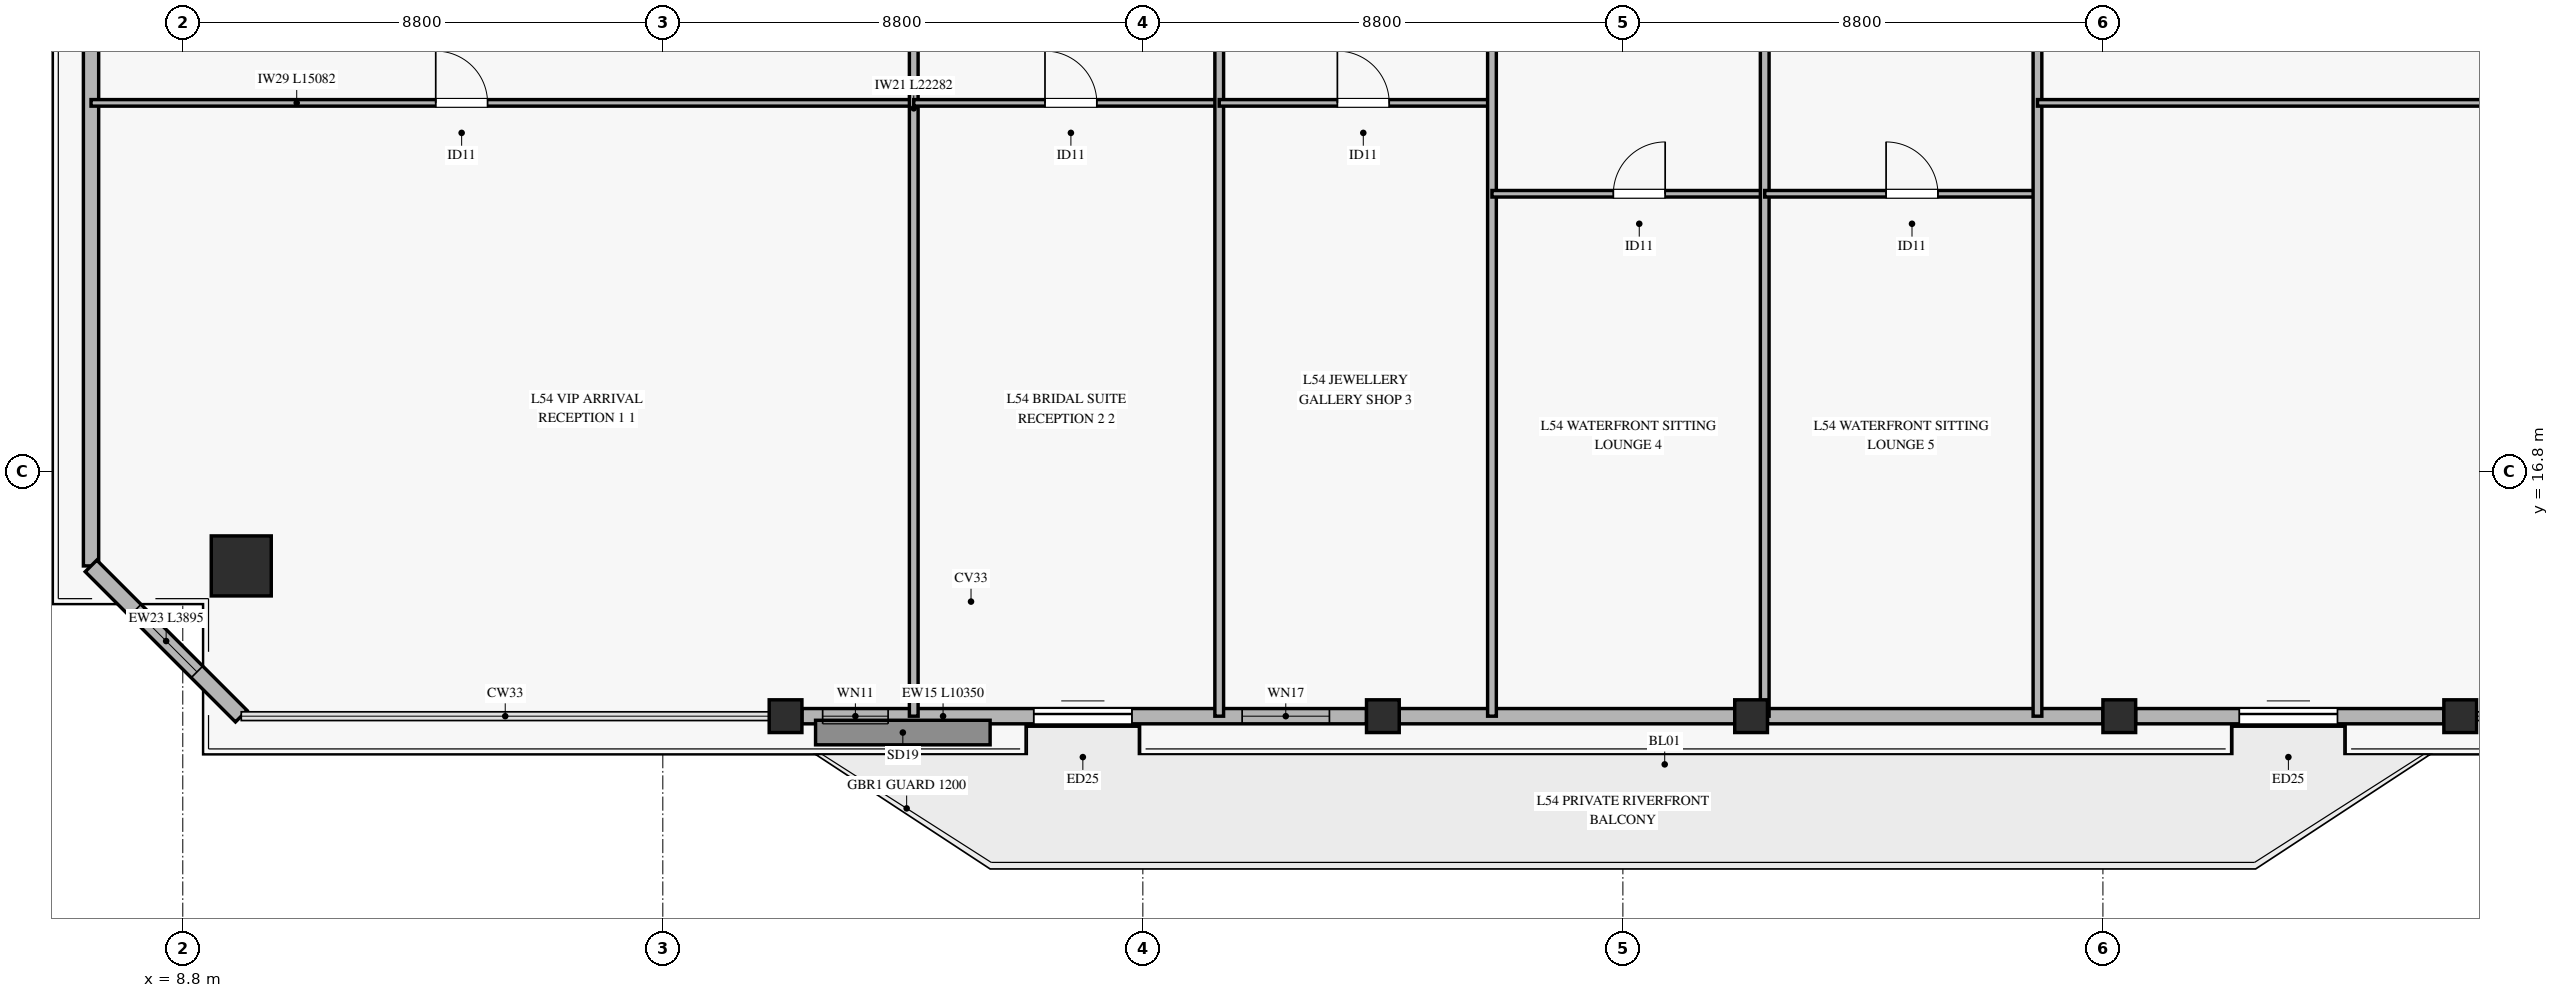
"""IFC4 building model, lengths in metres.
Left out: names, types, materials, properties, quantities, classifications, styles, units other than length and angle.
Written with IfcOpenShell. Run it as: python <this file> out.ifc"""

import sys

from ifc_helpers import new_model, si_unit, direction, frame, frame_2d, origin, origin_2d, place, context, subcontext, project, spatial, rectangle, hollow_rectangle, extrude, source, transform, mapped, element, fill, save


model = new_model("IFC4")
c1 = context("Model", 3, precision=1e-05, world=origin(), true_north=direction((0.0, 1.0)))
c2 = subcontext(c1, "Body", "Model", "MODEL_VIEW")
j1 = project(units=[si_unit("LENGTHUNIT", "METRE"), si_unit("PLANEANGLEUNIT", "RADIAN")], contexts=[c1])
p1 = place(None, origin())
s1 = spatial("IfcSite", under=j1, at=p1, CompositionType="ELEMENT")
p2 = place(p1, origin())
s2 = spatial("IfcBuilding", under=s1, at=p2, CompositionType="ELEMENT")
p3 = place(p2, frame((0.0, 0.0, 213.2)))
s3 = spatial("IfcBuildingStorey", under=s2, at=p3, CompositionType="ELEMENT", Elevation=213.2)
m1 = source(origin(), c2, "Body", "SweptSolid", [
    extrude(hollow_rectangle(XDim=1.1, YDim=1.1, WallThickness=0.05, at=origin_2d()), origin(), (0.0, 0.0, 1.0), 3.27),
])
p4 = place(p3, frame((9.872, 15.072, 0.0), z_axis=(0.0, 0.0, 1.0), x_axis=(1.0, 0.0, 0.0)))
e1 = element("IfcColumn", 1, at=p4, inside=s3, PredefinedType="COLUMN", context=c2, shape_type="MappedRepresentation", body=[
    mapped(m1, transform((0.0, 0.0, 0.0), x_axis=(1.0, 0.0, 0.0), y_axis=(0.0, 1.0, 0.0), z_axis=(0.0, 0.0, 1.0), scale=1.0)),
])
m2 = source(origin(), c2, "Body", "SweptSolid", [
    extrude(hollow_rectangle(XDim=0.6, YDim=0.6, WallThickness=0.028, at=origin_2d()), origin(), (0.0, 0.0, 1.0), 3.27),
])
for number, where, z_axis, x_axis in (
    (2, (19.85, 12.318, 0.0), (0.0, 0.0, 1.0), (1.0, 0.0, 0.0)),
    (3, (30.8, 12.318, 0.0), (0.0, 0.0, 1.0), (1.0, 0.0, 0.0)),
    (4, (37.55, 12.318, 0.0), (0.0, 0.0, 1.0), (1.0, 0.0, 0.0)),
    (5, (44.3, 12.318, 0.0), (0.0, 0.0, 1.0), (1.0, 0.0, 0.0)),
    (6, (50.55, 12.318, 0.0), (0.0, 0.0, 1.0), (1.0, 0.0, 0.0)),
):
    element("IfcColumn", number, at=place(p3, frame(where, z_axis=z_axis, x_axis=x_axis)), inside=s3, PredefinedType="COLUMN", context=c2, shape_type="MappedRepresentation", body=[
        mapped(m2, transform((0.0, 0.0, 0.0), x_axis=(1.0, 0.0, 0.0), y_axis=(0.0, 1.0, 0.0), z_axis=(0.0, 0.0, 1.0), scale=1.0)),
    ])
p5 = place(p3, frame((20.15, 12.318, 0.0), z_axis=(0.0, 0.0, 1.0), x_axis=(1.0, 0.0, 0.0)))
e7 = element("IfcWall", 7, at=p5, inside=s3, PredefinedType="SOLIDWALL", context=c2, shape_type="SweptSolid", body=[
    extrude(rectangle(XDim=10.35, YDim=0.28, at=frame_2d((5.175, 0.0))), origin(), (0.0, 0.0, 1.0), 2.75),
])
p6 = place(p5, frame((4.25, 0.0, 0.0)))
e8 = element("IfcOpeningElement", 8, at=p6, cuts=e7, PredefinedType="OPENING", context=c2, shape_type="SweptSolid", body=[
    extrude(rectangle(XDim=1.8, YDim=2.25, at=frame_2d((0.9, 1.125))), frame((0.0, 0.15, 0.0), z_axis=(0.0, -1.0, 0.0), x_axis=(1.0, 0.0, 0.0)), (0.0, 0.0, 1.0), 0.3),
])
p7 = place(p5, frame((0.38, 0.0, 0.45)))
e9 = element("IfcOpeningElement", 9, at=p7, cuts=e7, PredefinedType="OPENING", context=c2, shape_type="SweptSolid", body=[
    extrude(rectangle(XDim=1.2, YDim=2.0, at=frame_2d((0.6, 1.0))), frame((0.0, 0.15, 0.0), z_axis=(0.0, -1.0, 0.0), x_axis=(1.0, 0.0, 0.0)), (0.0, 0.0, 1.0), 0.3),
])
p8 = place(p5, frame((8.07, 0.0, 0.45)))
e10 = element("IfcOpeningElement", 10, at=p8, cuts=e7, PredefinedType="OPENING", context=c2, shape_type="SweptSolid", body=[
    extrude(rectangle(XDim=1.6, YDim=2.0, at=frame_2d((0.8, 1.0))), frame((0.0, 0.15, 0.0), z_axis=(0.0, -1.0, 0.0), x_axis=(1.0, 0.0, 0.0)), (0.0, 0.0, 1.0), 0.3),
])
for number, where, z_axis, x_axis in (
    (11, (31.1, 12.318, 0.0), (0.0, 0.0, 1.0), (1.0, 0.0, 0.0)),
    (12, (37.85, 12.318, 0.0), (0.0, 0.0, 1.0), (1.0, 0.0, 0.0)),
):
    element("IfcWall", number, at=place(p3, frame(where, z_axis=z_axis, x_axis=x_axis)), inside=s3, PredefinedType="SOLIDWALL", context=c2, shape_type="SweptSolid", body=[
        extrude(rectangle(XDim=6.15, YDim=0.28, at=frame_2d((3.075, 0.0))), origin(), (0.0, 0.0, 1.0), 2.75),
    ])
p9 = place(p3, frame((44.6, 12.318, 0.0), z_axis=(0.0, 0.0, 1.0), x_axis=(1.0, 0.0, 0.0)))
e13 = element("IfcWall", 13, at=p9, inside=s3, PredefinedType="SOLIDWALL", context=c2, shape_type="SweptSolid", body=[
    extrude(rectangle(XDim=5.65, YDim=0.28, at=frame_2d((2.825, 0.0))), origin(), (0.0, 0.0, 1.0), 2.75),
])
p10 = place(p9, frame((1.9, 0.0, 0.0)))
e14 = element("IfcOpeningElement", 14, at=p10, cuts=e13, PredefinedType="OPENING", context=c2, shape_type="SweptSolid", body=[
    extrude(rectangle(XDim=1.8, YDim=2.25, at=frame_2d((0.9, 1.125))), frame((0.0, 0.15, 0.0), z_axis=(0.0, -1.0, 0.0), x_axis=(1.0, 0.0, 0.0)), (0.0, 0.0, 1.0), 0.3),
])
p11 = place(p3, frame((7.118, 15.072, 0.0), z_axis=(0.0, 0.0, 1.0), x_axis=(0.0, 1.0, 0.0)))
e15 = element("IfcWall", 15, at=p11, inside=s3, PredefinedType="SOLIDWALL", context=c2, shape_type="SweptSolid", body=[
    extrude(rectangle(XDim=13.837, YDim=0.28, at=frame_2d((6.918, 0.0))), origin(), (0.0, 0.0, 1.0), 2.75),
])
p12 = place(p11, frame((9.71, 0.0, 0.45)))
e16 = element("IfcOpeningElement", 16, at=p12, cuts=e15, PredefinedType="OPENING", context=c2, shape_type="SweptSolid", body=[
    extrude(rectangle(XDim=2.0, YDim=2.0, at=frame_2d((1.0, 1.0))), frame((0.0, 0.15, 0.0), z_axis=(0.0, -1.0, 0.0), x_axis=(1.0, 0.0, 0.0)), (0.0, 0.0, 1.0), 0.3),
])
p13 = place(p3, frame((7.118, 15.072, 0.0), z_axis=(0.0, 0.0, 1.0), x_axis=(0.707138122488, -0.707075438496, 0.0)))
e17 = element("IfcWall", 17, at=p13, inside=s3, PredefinedType="SOLIDWALL", context=c2, shape_type="SweptSolid", body=[
    extrude(rectangle(XDim=3.895, YDim=0.3, at=frame_2d((1.947, 0.0))), origin(), (0.0, 0.0, 1.0), 2.75),
])
p14 = place(p13, frame((1.147, 0.0, 0.45)))
e18 = element("IfcOpeningElement", 18, at=p14, cuts=e17, PredefinedType="OPENING", context=c2, shape_type="SweptSolid", body=[
    extrude(rectangle(XDim=1.6, YDim=2.0, at=frame_2d((0.8, 1.0))), frame((0.0, 0.16, 0.0), z_axis=(0.0, -1.0, 0.0), x_axis=(1.0, 0.0, 0.0)), (0.0, 0.0, 1.0), 0.32),
])
p15 = place(p3, frame((7.118, 23.559, 0.0), z_axis=(0.0, 0.0, 1.0), x_axis=(1.0, 0.0, 0.0)))
e19 = element("IfcWall", 19, at=p15, inside=s3, PredefinedType="PARTITIONING", context=c2, shape_type="SweptSolid", body=[
    extrude(rectangle(XDim=15.082, YDim=0.12, at=frame_2d((7.541, 0.0))), origin(), (0.0, 0.0, 1.0), 2.455),
])
p16 = place(p15, frame((6.319, 0.0, 0.0)))
e20 = element("IfcOpeningElement", 20, at=p16, cuts=e19, PredefinedType="OPENING", context=c2, shape_type="SweptSolid", body=[
    extrude(rectangle(XDim=0.95, YDim=2.1, at=frame_2d((0.475, 1.05))), frame((0.0, 0.07, 0.0), z_axis=(0.0, -1.0, 0.0), x_axis=(1.0, 0.0, 0.0)), (0.0, 0.0, 1.0), 0.14),
])
p17 = place(p3, frame((22.2, 12.318, 0.0), z_axis=(0.0, 0.0, 1.0), x_axis=(0.0, 1.0, 0.0)))
e21 = element("IfcWall", 21, at=p17, inside=s3, PredefinedType="PARTITIONING", context=c2, shape_type="SweptSolid", body=[
    extrude(rectangle(XDim=22.282, YDim=0.16, at=frame_2d((11.141, 0.0))), origin(), (0.0, 0.0, 1.0), 2.755),
])
p18 = place(p3, frame((22.2, 23.559, 0.0), z_axis=(0.0, 0.0, 1.0), x_axis=(1.0, 0.0, 0.0)))
e22 = element("IfcWall", 22, at=p18, inside=s3, PredefinedType="PARTITIONING", context=c2, shape_type="SweptSolid", body=[
    extrude(rectangle(XDim=5.6, YDim=0.12, at=frame_2d((2.8, 0.0))), origin(), (0.0, 0.0, 1.0), 3.27),
])
p19 = place(p18, frame((2.406, 0.0, 0.0)))
e23 = element("IfcOpeningElement", 23, at=p19, cuts=e22, PredefinedType="OPENING", context=c2, shape_type="SweptSolid", body=[
    extrude(rectangle(XDim=0.95, YDim=2.1, at=frame_2d((0.475, 1.05))), frame((0.0, 0.07, 0.0), z_axis=(0.0, -1.0, 0.0), x_axis=(1.0, 0.0, 0.0)), (0.0, 0.0, 1.0), 0.14),
])
p20 = place(p3, frame((27.8, 12.318, 0.0), z_axis=(0.0, 0.0, 1.0), x_axis=(0.0, 1.0, 0.0)))
e24 = element("IfcWall", 24, at=p20, inside=s3, PredefinedType="PARTITIONING", context=c2, shape_type="SweptSolid", body=[
    extrude(rectangle(XDim=22.282, YDim=0.16, at=frame_2d((11.141, 0.0))), origin(), (0.0, 0.0, 1.0), 2.755),
])
p21 = place(p3, frame((27.8, 23.559, 0.0), z_axis=(0.0, 0.0, 1.0), x_axis=(1.0, 0.0, 0.0)))
e25 = element("IfcWall", 25, at=p21, inside=s3, PredefinedType="PARTITIONING", context=c2, shape_type="SweptSolid", body=[
    extrude(rectangle(XDim=5.0, YDim=0.12, at=frame_2d((2.5, 0.0))), origin(), (0.0, 0.0, 1.0), 2.455),
])
p22 = place(p21, frame((2.166, 0.0, 0.0)))
e26 = element("IfcOpeningElement", 26, at=p22, cuts=e25, PredefinedType="OPENING", context=c2, shape_type="SweptSolid", body=[
    extrude(rectangle(XDim=0.95, YDim=2.1, at=frame_2d((0.475, 1.05))), frame((0.0, 0.07, 0.0), z_axis=(0.0, -1.0, 0.0), x_axis=(1.0, 0.0, 0.0)), (0.0, 0.0, 1.0), 0.14),
])
p23 = place(p3, frame((32.8, 12.318, 0.0), z_axis=(0.0, 0.0, 1.0), x_axis=(0.0, 1.0, 0.0)))
e27 = element("IfcWall", 27, at=p23, inside=s3, PredefinedType="PARTITIONING", context=c2, shape_type="SweptSolid", body=[
    extrude(rectangle(XDim=22.282, YDim=0.16, at=frame_2d((11.141, 0.0))), origin(), (0.0, 0.0, 1.0), 2.755),
])
p24 = place(p3, frame((32.8, 21.893, 0.0), z_axis=(0.0, 0.0, 1.0), x_axis=(1.0, 0.0, 0.0)))
e28 = element("IfcWall", 28, at=p24, inside=s3, PredefinedType="PARTITIONING", context=c2, shape_type="SweptSolid", body=[
    extrude(rectangle(XDim=5.0, YDim=0.12, at=frame_2d((2.5, 0.0))), origin(), (0.0, 0.0, 1.0), 2.455),
])
p25 = place(p24, frame((2.225, 0.0, 0.0)))
e29 = element("IfcOpeningElement", 29, at=p25, cuts=e28, PredefinedType="OPENING", context=c2, shape_type="SweptSolid", body=[
    extrude(rectangle(XDim=0.95, YDim=2.1, at=frame_2d((0.475, 1.05))), frame((0.0, 0.07, 0.0), z_axis=(0.0, -1.0, 0.0), x_axis=(1.0, 0.0, 0.0)), (0.0, 0.0, 1.0), 0.14),
])
p26 = place(p3, frame((37.8, 12.318, 0.0), z_axis=(0.0, 0.0, 1.0), x_axis=(0.0, 1.0, 0.0)))
e30 = element("IfcWall", 30, at=p26, inside=s3, PredefinedType="PARTITIONING", context=c2, shape_type="SweptSolid", body=[
    extrude(rectangle(XDim=22.282, YDim=0.16, at=frame_2d((11.141, 0.0))), origin(), (0.0, 0.0, 1.0), 2.455),
])
p27 = place(p3, frame((37.8, 21.893, 0.0), z_axis=(0.0, 0.0, 1.0), x_axis=(1.0, 0.0, 0.0)))
e31 = element("IfcWall", 31, at=p27, inside=s3, PredefinedType="PARTITIONING", context=c2, shape_type="SweptSolid", body=[
    extrude(rectangle(XDim=5.0, YDim=0.12, at=frame_2d((2.5, 0.0))), origin(), (0.0, 0.0, 1.0), 3.27),
])
p28 = place(p27, frame((2.225, 0.0, 0.0)))
e32 = element("IfcOpeningElement", 32, at=p28, cuts=e31, PredefinedType="OPENING", context=c2, shape_type="SweptSolid", body=[
    extrude(rectangle(XDim=0.95, YDim=2.1, at=frame_2d((0.475, 1.05))), frame((0.0, 0.07, 0.0), z_axis=(0.0, -1.0, 0.0), x_axis=(1.0, 0.0, 0.0)), (0.0, 0.0, 1.0), 0.14),
])
p29 = place(p3, frame((42.8, 12.318, 0.0), z_axis=(0.0, 0.0, 1.0), x_axis=(0.0, 1.0, 0.0)))
e33 = element("IfcWall", 33, at=p29, inside=s3, PredefinedType="PARTITIONING", context=c2, shape_type="SweptSolid", body=[
    extrude(rectangle(XDim=22.282, YDim=0.16, at=frame_2d((11.141, 0.0))), origin(), (0.0, 0.0, 1.0), 2.755),
])
p30 = place(p3, frame((42.8, 23.559, 0.0), z_axis=(0.0, 0.0, 1.0), x_axis=(1.0, 0.0, 0.0)))
e34 = element("IfcWall", 34, at=p30, inside=s3, PredefinedType="PARTITIONING", context=c2, shape_type="SweptSolid", body=[
    extrude(rectangle(XDim=20.482, YDim=0.12, at=frame_2d((10.241, 0.0))), origin(), (0.0, 0.0, 1.0), 2.455),
])
p31 = place(p30, frame((8.279, 0.0, 0.0)))
e35 = element("IfcOpeningElement", 35, at=p31, cuts=e34, PredefinedType="OPENING", context=c2, shape_type="SweptSolid", body=[
    extrude(rectangle(XDim=0.95, YDim=2.1, at=frame_2d((0.475, 1.05))), frame((0.0, 0.07, 0.0), z_axis=(0.0, -1.0, 0.0), x_axis=(1.0, 0.0, 0.0)), (0.0, 0.0, 1.0), 0.14),
])
m3 = source(origin(), c2, "Body", "SweptSolid", [
    extrude(rectangle(XDim=1.8, YDim=2.25, at=frame_2d((0.9, 1.125))), frame((0.0, 0.025, 0.0), z_axis=(0.0, -1.0, 0.0), x_axis=(1.0, 0.0, 0.0)), (0.0, 0.0, 1.0), 0.05),
])
p32 = place(p6, origin())
e36 = element("IfcDoor", 36, at=p32, inside=s3, OperationType="SLIDING_TO_LEFT", PredefinedType="DOOR", context=c2, shape_type="MappedRepresentation", body=[
    mapped(m3, transform((0.0, 0.0, 0.0), x_axis=(1.0, 0.0, 0.0), y_axis=(0.0, 1.0, 0.0), z_axis=(0.0, 0.0, 1.0), scale=1.0)),
])
fill(e8, e36)
m4 = source(origin(), c2, "Body", "SweptSolid", [
    extrude(rectangle(XDim=1.2, YDim=2.0, at=frame_2d((0.6, 1.0))), frame((0.0, 0.03, 0.0), z_axis=(0.0, -1.0, 0.0), x_axis=(1.0, 0.0, 0.0)), (0.0, 0.0, 1.0), 0.06),
])
p33 = place(p7, origin())
e37 = element("IfcWindow", 37, at=p33, inside=s3, PartitioningType="SINGLE_PANEL", PredefinedType="WINDOW", context=c2, shape_type="MappedRepresentation", body=[
    mapped(m4, transform((0.0, 0.0, 0.0), x_axis=(1.0, 0.0, 0.0), y_axis=(0.0, 1.0, 0.0), z_axis=(0.0, 0.0, 1.0), scale=1.0)),
])
fill(e9, e37)
m5 = source(origin(), c2, "Body", "SweptSolid", [
    extrude(rectangle(XDim=1.6, YDim=2.0, at=frame_2d((0.8, 1.0))), frame((0.0, 0.03, 0.0), z_axis=(0.0, -1.0, 0.0), x_axis=(1.0, 0.0, 0.0)), (0.0, 0.0, 1.0), 0.06),
])
p34 = place(p8, origin())
e38 = element("IfcWindow", 38, at=p34, inside=s3, PartitioningType="SINGLE_PANEL", PredefinedType="WINDOW", context=c2, shape_type="MappedRepresentation", body=[
    mapped(m5, transform((0.0, 0.0, 0.0), x_axis=(1.0, 0.0, 0.0), y_axis=(0.0, 1.0, 0.0), z_axis=(0.0, 0.0, 1.0), scale=1.0)),
])
fill(e10, e38)
p35 = place(p10, origin())
e39 = element("IfcDoor", 39, at=p35, inside=s3, OperationType="SLIDING_TO_LEFT", PredefinedType="DOOR", context=c2, shape_type="MappedRepresentation", body=[
    mapped(m3, transform((0.0, 0.0, 0.0), x_axis=(1.0, 0.0, 0.0), y_axis=(0.0, 1.0, 0.0), z_axis=(0.0, 0.0, 1.0), scale=1.0)),
])
fill(e14, e39)
p36 = place(p14, origin())
e40 = element("IfcWindow", 40, at=p36, inside=s3, PartitioningType="SINGLE_PANEL", PredefinedType="WINDOW", context=c2, shape_type="MappedRepresentation", body=[
    mapped(m5, transform((0.0, 0.0, 0.0), x_axis=(1.0, 0.0, 0.0), y_axis=(0.0, 1.0, 0.0), z_axis=(0.0, 0.0, 1.0), scale=1.0)),
])
fill(e18, e40)
m6 = source(origin(), c2, "Body", "SweptSolid", [
    extrude(rectangle(XDim=0.95, YDim=2.1, at=frame_2d((0.475, 1.05))), frame((0.0, 0.025, 0.0), z_axis=(0.0, -1.0, 0.0), x_axis=(1.0, 0.0, 0.0)), (0.0, 0.0, 1.0), 0.05),
])
p37 = place(p16, origin())
e41 = element("IfcDoor", 41, at=p37, inside=s3, OperationType="SINGLE_SWING_LEFT", PredefinedType="DOOR", context=c2, shape_type="MappedRepresentation", body=[
    mapped(m6, transform((0.0, 0.0, 0.0), x_axis=(1.0, 0.0, 0.0), y_axis=(0.0, 1.0, 0.0), z_axis=(0.0, 0.0, 1.0), scale=1.0)),
])
fill(e20, e41)
p38 = place(p19, origin())
e42 = element("IfcDoor", 42, at=p38, inside=s3, OperationType="SINGLE_SWING_LEFT", PredefinedType="DOOR", context=c2, shape_type="MappedRepresentation", body=[
    mapped(m6, transform((0.0, 0.0, 0.0), x_axis=(1.0, 0.0, 0.0), y_axis=(0.0, 1.0, 0.0), z_axis=(0.0, 0.0, 1.0), scale=1.0)),
])
fill(e23, e42)
p39 = place(p22, origin())
e43 = element("IfcDoor", 43, at=p39, inside=s3, OperationType="SINGLE_SWING_LEFT", PredefinedType="DOOR", context=c2, shape_type="MappedRepresentation", body=[
    mapped(m6, transform((0.0, 0.0, 0.0), x_axis=(1.0, 0.0, 0.0), y_axis=(0.0, 1.0, 0.0), z_axis=(0.0, 0.0, 1.0), scale=1.0)),
])
fill(e26, e43)
p40 = place(p25, origin())
e44 = element("IfcDoor", 44, at=p40, inside=s3, OperationType="SINGLE_SWING_RIGHT", PredefinedType="DOOR", context=c2, shape_type="MappedRepresentation", body=[
    mapped(m6, transform((0.0, 0.0, 0.0), x_axis=(1.0, 0.0, 0.0), y_axis=(0.0, 1.0, 0.0), z_axis=(0.0, 0.0, 1.0), scale=1.0)),
])
fill(e29, e44)
p41 = place(p28, origin())
e45 = element("IfcDoor", 45, at=p41, inside=s3, OperationType="SINGLE_SWING_LEFT", PredefinedType="DOOR", context=c2, shape_type="MappedRepresentation", body=[
    mapped(m6, transform((0.0, 0.0, 0.0), x_axis=(1.0, 0.0, 0.0), y_axis=(0.0, 1.0, 0.0), z_axis=(0.0, 0.0, 1.0), scale=1.0)),
])
fill(e32, e45)
save(model, sys.argv[1])
